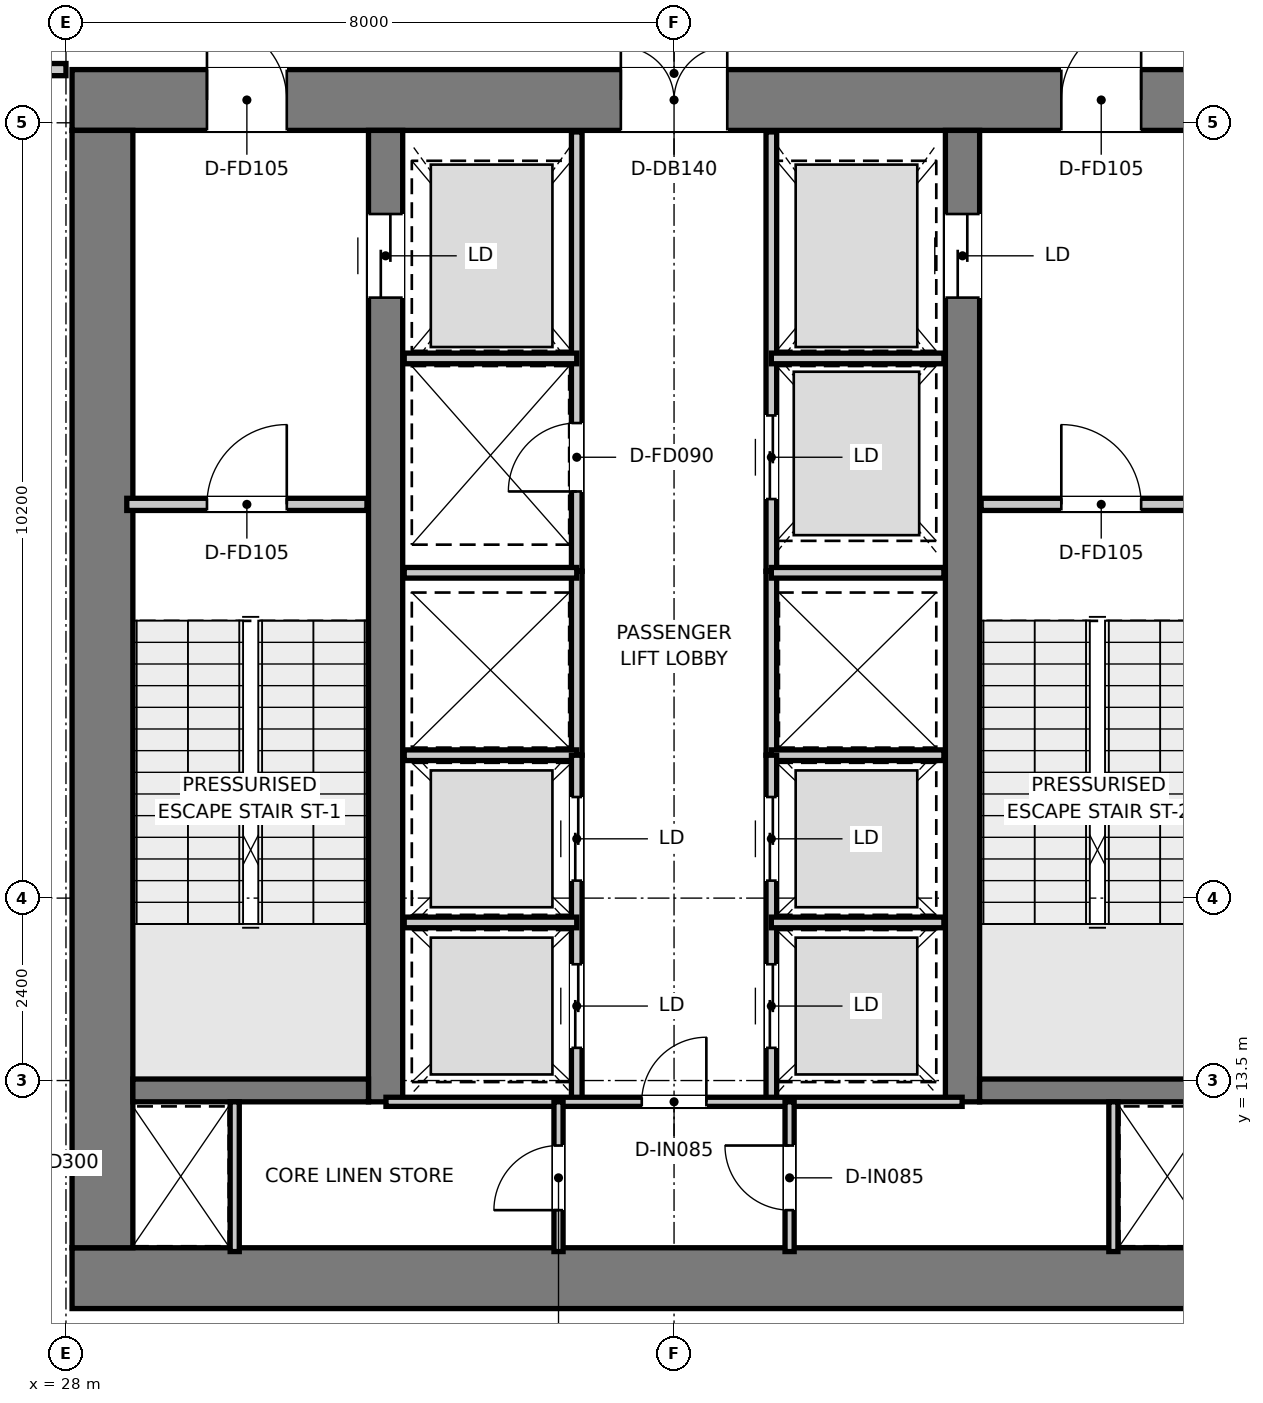
"""IFC4 building model, lengths in metres.
Left out: names, types, materials, properties, quantities, classifications, styles, units other than length and angle.
Written with IfcOpenShell. Run it as: python <this file> out.ifc"""

import sys

from ifc_helpers import new_model, si_unit, direction, frame, frame_2d, origin, place, context, subcontext, project, spatial, rectangle, extrude, element, fill, save


model = new_model("IFC4")
c1 = context("Model", 3, precision=1e-05, world=origin(), true_north=direction((0.0, 1.0)))
c2 = subcontext(c1, "Body", "Model", "MODEL_VIEW")
j1 = project(units=[si_unit("LENGTHUNIT", "METRE"), si_unit("PLANEANGLEUNIT", "RADIAN")], contexts=[c1])
p1 = place(None, origin())
s1 = spatial("IfcSite", under=j1, at=p1, CompositionType="ELEMENT")
p2 = place(p1, origin())
s2 = spatial("IfcBuilding", under=s1, at=p2, CompositionType="ELEMENT")
p3 = place(p2, frame((0.0, 0.0, 10.4)))
s3 = spatial("IfcBuildingStorey", under=s2, at=p3, CompositionType="ELEMENT", Elevation=10.4)
p4 = place(p3, frame((28.08, 10.9, 0.0), z_axis=(0.0, 0.0, 1.0), x_axis=(1.0, 0.0, 0.0)))
e1 = element("IfcWall", 1, at=p4, inside=s3, PredefinedType="SHEAR", context=c2, shape_type="SweptSolid", body=[
    extrude(rectangle(XDim=15.84, YDim=0.8, at=frame_2d((7.92, 0.0))), origin(), (0.0, 0.0, 1.0), 5.0),
])
p5 = place(p3, frame((28.08, 26.4, 0.0), z_axis=(0.0, 0.0, 1.0), x_axis=(1.0, 0.0, 0.0)))
e2 = element("IfcWall", 2, at=p5, inside=s3, PredefinedType="SHEAR", context=c2, shape_type="SweptSolid", body=[
    extrude(rectangle(XDim=15.84, YDim=0.8, at=frame_2d((7.92, 0.0))), origin(), (0.0, 0.0, 1.0), 5.0),
])
p6 = place(p5, frame((7.22, 0.0, 0.0)))
e3 = element("IfcOpeningElement", 3, at=p6, cuts=e2, PredefinedType="OPENING", context=c2, shape_type="SweptSolid", body=[
    extrude(rectangle(XDim=1.4, YDim=2.2, at=frame_2d((0.7, 1.1))), frame((0.0, 0.41, 0.0), z_axis=(0.0, -1.0, 0.0), x_axis=(1.0, 0.0, 0.0)), (0.0, 0.0, 1.0), 0.82),
])
p7 = place(p5, frame((1.775, 0.0, 0.0)))
e4 = element("IfcOpeningElement", 4, at=p7, cuts=e2, PredefinedType="OPENING", context=c2, shape_type="SweptSolid", body=[
    extrude(rectangle(XDim=1.05, YDim=2.1, at=frame_2d((0.525, 1.05))), frame((0.0, 0.41, 0.0), z_axis=(0.0, -1.0, 0.0), x_axis=(1.0, 0.0, 0.0)), (0.0, 0.0, 1.0), 0.82),
])
p8 = place(p5, frame((13.015, 0.0, 0.0)))
e5 = element("IfcOpeningElement", 5, at=p8, cuts=e2, PredefinedType="OPENING", context=c2, shape_type="SweptSolid", body=[
    extrude(rectangle(XDim=1.05, YDim=2.1, at=frame_2d((0.525, 1.05))), frame((0.0, 0.41, 0.0), z_axis=(0.0, -1.0, 0.0), x_axis=(1.0, 0.0, 0.0)), (0.0, 0.0, 1.0), 0.82),
])
p9 = place(p3, frame((28.48, 11.3, 0.0), z_axis=(0.0, 0.0, 1.0), x_axis=(0.0, 1.0, 0.0)))
e6 = element("IfcWall", 6, at=p9, inside=s3, PredefinedType="SHEAR", context=c2, shape_type="SweptSolid", body=[
    extrude(rectangle(XDim=14.7, YDim=0.8, at=frame_2d((7.35, 0.0))), origin(), (0.0, 0.0, 1.0), 5.0),
])
p10 = place(p3, frame((32.205, 13.22, 0.0), z_axis=(0.0, 0.0, 1.0), x_axis=(0.0, 1.0, 0.0)))
e7 = element("IfcWall", 7, at=p10, inside=s3, PredefinedType="SHEAR", context=c2, shape_type="SweptSolid", body=[
    extrude(rectangle(XDim=12.78, YDim=0.45, at=frame_2d((6.39, 0.0))), origin(), (0.0, 0.0, 1.0), 5.0),
])
p11 = place(p10, frame((10.58, 0.0, 0.0)))
e8 = element("IfcOpeningElement", 8, at=p11, cuts=e7, PredefinedType="OPENING", context=c2, shape_type="SweptSolid", body=[
    extrude(rectangle(XDim=1.1, YDim=2.15, at=frame_2d((0.55, 1.075))), frame((0.0, 0.235, 0.0), z_axis=(0.0, -1.0, 0.0), x_axis=(1.0, 0.0, 0.0)), (0.0, 0.0, 1.0), 0.47),
])
p12 = place(p3, frame((39.795, 13.22, 0.0), z_axis=(0.0, 0.0, 1.0), x_axis=(0.0, 1.0, 0.0)))
e9 = element("IfcWall", 9, at=p12, inside=s3, PredefinedType="SHEAR", context=c2, shape_type="SweptSolid", body=[
    extrude(rectangle(XDim=12.78, YDim=0.45, at=frame_2d((6.39, 0.0))), origin(), (0.0, 0.0, 1.0), 5.0),
])
p13 = place(p12, frame((10.58, 0.0, 0.0)))
e10 = element("IfcOpeningElement", 10, at=p13, cuts=e9, PredefinedType="OPENING", context=c2, shape_type="SweptSolid", body=[
    extrude(rectangle(XDim=1.1, YDim=2.15, at=frame_2d((0.55, 1.075))), frame((0.0, 0.235, 0.0), z_axis=(0.0, -1.0, 0.0), x_axis=(1.0, 0.0, 0.0)), (0.0, 0.0, 1.0), 0.47),
])
for number, where, z_axis, x_axis in (
    (11, (28.88, 13.37, 0.0), (0.0, 0.0, 1.0), (1.0, 0.0, 0.0)),
    (12, (40.02, 13.37, 0.0), (0.0, 0.0, 1.0), (1.0, 0.0, 0.0)),
):
    element("IfcWall", number, at=place(p3, frame(where, z_axis=z_axis, x_axis=x_axis)), inside=s3, PredefinedType="SHEAR", context=c2, shape_type="SweptSolid", body=[
        extrude(rectangle(XDim=3.1, YDim=0.3, at=frame_2d((1.55, 0.0))), origin(), (0.0, 0.0, 1.0), 5.0),
    ])
p14 = place(p3, frame((28.8, 21.08, 0.0), z_axis=(0.0, 0.0, 1.0), x_axis=(1.0, 0.0, 0.0)))
e13 = element("IfcWall", 13, at=p14, inside=s3, PredefinedType="PARTITIONING", context=c2, shape_type="SweptSolid", body=[
    extrude(rectangle(XDim=3.16, YDim=0.16, at=frame_2d((1.58, 0.0))), origin(), (0.0, 0.0, 1.0), 4.7),
])
p15 = place(p14, frame((1.055, 0.0, 0.0)))
e14 = element("IfcOpeningElement", 14, at=p15, cuts=e13, PredefinedType="OPENING", context=c2, shape_type="SweptSolid", body=[
    extrude(rectangle(XDim=1.05, YDim=2.1, at=frame_2d((0.525, 1.05))), frame((0.0, 0.09, 0.0), z_axis=(0.0, -1.0, 0.0), x_axis=(1.0, 0.0, 0.0)), (0.0, 0.0, 1.0), 0.18),
])
p16 = place(p3, frame((40.04, 21.08, 0.0), z_axis=(0.0, 0.0, 1.0), x_axis=(1.0, 0.0, 0.0)))
e15 = element("IfcWall", 15, at=p16, inside=s3, PredefinedType="PARTITIONING", context=c2, shape_type="SweptSolid", body=[
    extrude(rectangle(XDim=3.16, YDim=0.16, at=frame_2d((1.58, 0.0))), origin(), (0.0, 0.0, 1.0), 4.7),
])
p17 = place(p16, frame((1.055, 0.0, 0.0)))
e16 = element("IfcOpeningElement", 16, at=p17, cuts=e15, PredefinedType="OPENING", context=c2, shape_type="SweptSolid", body=[
    extrude(rectangle(XDim=1.05, YDim=2.1, at=frame_2d((0.525, 1.05))), frame((0.0, 0.09, 0.0), z_axis=(0.0, -1.0, 0.0), x_axis=(1.0, 0.0, 0.0)), (0.0, 0.0, 1.0), 0.18),
])
p18 = place(p3, frame((34.72, 20.2, 0.0), z_axis=(0.0, 0.0, 1.0), x_axis=(0.0, 1.0, 0.0)))
e17 = element("IfcWall", 17, at=p18, inside=s3, PredefinedType="PARTITIONING", context=c2, shape_type="SweptSolid", body=[
    extrude(rectangle(XDim=5.78, YDim=0.14, at=frame_2d((2.89, 0.0))), origin(), (0.0, 0.0, 1.0), 3.5),
])
p19 = place(p18, frame((1.05, 0.0, 0.0)))
e18 = element("IfcOpeningElement", 18, at=p19, cuts=e17, PredefinedType="OPENING", context=c2, shape_type="SweptSolid", body=[
    extrude(rectangle(XDim=0.9, YDim=2.1, at=frame_2d((0.45, 1.05))), frame((0.0, 0.08, 0.0), z_axis=(0.0, -1.0, 0.0), x_axis=(1.0, 0.0, 0.0)), (0.0, 0.0, 1.0), 0.16),
])
p20 = place(p3, frame((37.28, 20.2, 0.0), z_axis=(0.0, 0.0, 1.0), x_axis=(0.0, 1.0, 0.0)))
e19 = element("IfcWall", 19, at=p20, inside=s3, PredefinedType="PARTITIONING", context=c2, shape_type="SweptSolid", body=[
    extrude(rectangle(XDim=5.78, YDim=0.14, at=frame_2d((2.89, 0.0))), origin(), (0.0, 0.0, 1.0), 3.5),
])
p21 = place(p20, frame((0.95, 0.0, 0.0)))
e20 = element("IfcOpeningElement", 20, at=p21, cuts=e19, PredefinedType="OPENING", context=c2, shape_type="SweptSolid", body=[
    extrude(rectangle(XDim=1.1, YDim=2.15, at=frame_2d((0.55, 1.075))), frame((0.0, 0.08, 0.0), z_axis=(0.0, -1.0, 0.0), x_axis=(1.0, 0.0, 0.0)), (0.0, 0.0, 1.0), 0.16),
])
for number, where, z_axis, x_axis in (
    (21, (32.45, 23.0, 0.0), (0.0, 0.0, 1.0), (1.0, 0.0, 0.0)),
    (22, (37.28, 23.0, 0.0), (0.0, 0.0, 1.0), (1.0, 0.0, 0.0)),
):
    element("IfcWall", number, at=place(p3, frame(where, z_axis=z_axis, x_axis=x_axis)), inside=s3, PredefinedType="PARTITIONING", context=c2, shape_type="SweptSolid", body=[
        extrude(rectangle(XDim=2.27, YDim=0.14, at=frame_2d((1.135, 0.0))), origin(), (0.0, 0.0, 1.0), 3.5),
    ])
for number, where, z_axis, x_axis in (
    (23, (34.72, 17.78, 0.0), (0.0, 0.0, 1.0), (0.0, 1.0, 0.0)),
    (24, (37.28, 17.78, 0.0), (0.0, 0.0, 1.0), (0.0, 1.0, 0.0)),
):
    element("IfcWall", number, at=place(p3, frame(where, z_axis=z_axis, x_axis=x_axis)), inside=s3, PredefinedType="PARTITIONING", context=c2, shape_type="SweptSolid", body=[
        extrude(rectangle(XDim=2.42, YDim=0.14, at=frame_2d((1.21, 0.0))), origin(), (0.0, 0.0, 1.0), 4.7),
    ])
for number, where, z_axis, x_axis in (
    (25, (32.45, 17.78, 0.0), (0.0, 0.0, 1.0), (1.0, 0.0, 0.0)),
    (26, (32.45, 20.18, 0.0), (0.0, 0.0, 1.0), (1.0, 0.0, 0.0)),
    (27, (37.28, 17.78, 0.0), (0.0, 0.0, 1.0), (1.0, 0.0, 0.0)),
    (28, (37.28, 20.18, 0.0), (0.0, 0.0, 1.0), (1.0, 0.0, 0.0)),
):
    element("IfcWall", number, at=place(p3, frame(where, z_axis=z_axis, x_axis=x_axis)), inside=s3, PredefinedType="PARTITIONING", context=c2, shape_type="SweptSolid", body=[
        extrude(rectangle(XDim=2.27, YDim=0.14, at=frame_2d((1.135, 0.0))), origin(), (0.0, 0.0, 1.0), 4.7),
    ])
p22 = place(p3, frame((34.72, 13.22, 0.0), z_axis=(0.0, 0.0, 1.0), x_axis=(0.0, 1.0, 0.0)))
e29 = element("IfcWall", 29, at=p22, inside=s3, PredefinedType="PARTITIONING", context=c2, shape_type="SweptSolid", body=[
    extrude(rectangle(XDim=4.56, YDim=0.14, at=frame_2d((2.28, 0.0))), origin(), (0.0, 0.0, 1.0), 4.7),
])
p23 = place(p22, frame((0.71, 0.0, 0.0)))
e30 = element("IfcOpeningElement", 30, at=p23, cuts=e29, PredefinedType="OPENING", context=c2, shape_type="SweptSolid", body=[
    extrude(rectangle(XDim=1.1, YDim=2.15, at=frame_2d((0.55, 1.075))), frame((0.0, 0.08, 0.0), z_axis=(0.0, -1.0, 0.0), x_axis=(1.0, 0.0, 0.0)), (0.0, 0.0, 1.0), 0.16),
])
p24 = place(p22, frame((2.91, 0.0, 0.0)))
e31 = element("IfcOpeningElement", 31, at=p24, cuts=e29, PredefinedType="OPENING", context=c2, shape_type="SweptSolid", body=[
    extrude(rectangle(XDim=1.1, YDim=2.15, at=frame_2d((0.55, 1.075))), frame((0.0, 0.08, 0.0), z_axis=(0.0, -1.0, 0.0), x_axis=(1.0, 0.0, 0.0)), (0.0, 0.0, 1.0), 0.16),
])
p25 = place(p3, frame((32.45, 15.58, 0.0), z_axis=(0.0, 0.0, 1.0), x_axis=(1.0, 0.0, 0.0)))
e32 = element("IfcWall", 32, at=p25, inside=s3, PredefinedType="PARTITIONING", context=c2, shape_type="SweptSolid", body=[
    extrude(rectangle(XDim=2.27, YDim=0.14, at=frame_2d((1.135, 0.0))), origin(), (0.0, 0.0, 1.0), 4.7),
])
p26 = place(p3, frame((37.28, 13.22, 0.0), z_axis=(0.0, 0.0, 1.0), x_axis=(0.0, 1.0, 0.0)))
e33 = element("IfcWall", 33, at=p26, inside=s3, PredefinedType="PARTITIONING", context=c2, shape_type="SweptSolid", body=[
    extrude(rectangle(XDim=4.56, YDim=0.14, at=frame_2d((2.28, 0.0))), origin(), (0.0, 0.0, 1.0), 4.7),
])
p27 = place(p26, frame((0.71, 0.0, 0.0)))
e34 = element("IfcOpeningElement", 34, at=p27, cuts=e33, PredefinedType="OPENING", context=c2, shape_type="SweptSolid", body=[
    extrude(rectangle(XDim=1.1, YDim=2.15, at=frame_2d((0.55, 1.075))), frame((0.0, 0.08, 0.0), z_axis=(0.0, -1.0, 0.0), x_axis=(1.0, 0.0, 0.0)), (0.0, 0.0, 1.0), 0.16),
])
p28 = place(p26, frame((2.91, 0.0, 0.0)))
e35 = element("IfcOpeningElement", 35, at=p28, cuts=e33, PredefinedType="OPENING", context=c2, shape_type="SweptSolid", body=[
    extrude(rectangle(XDim=1.1, YDim=2.15, at=frame_2d((0.55, 1.075))), frame((0.0, 0.08, 0.0), z_axis=(0.0, -1.0, 0.0), x_axis=(1.0, 0.0, 0.0)), (0.0, 0.0, 1.0), 0.16),
])
p29 = place(p3, frame((37.28, 15.58, 0.0), z_axis=(0.0, 0.0, 1.0), x_axis=(1.0, 0.0, 0.0)))
e36 = element("IfcWall", 36, at=p29, inside=s3, PredefinedType="PARTITIONING", context=c2, shape_type="SweptSolid", body=[
    extrude(rectangle(XDim=2.27, YDim=0.14, at=frame_2d((1.135, 0.0))), origin(), (0.0, 0.0, 1.0), 4.7),
])
for number, where, z_axis, x_axis in (
    (37, (30.22, 11.25, 0.0), (0.0, 0.0, 1.0), (0.0, 1.0, 0.0)),
    (38, (41.78, 11.25, 0.0), (0.0, 0.0, 1.0), (0.0, 1.0, 0.0)),
):
    element("IfcWall", number, at=place(p3, frame(where, z_axis=z_axis, x_axis=x_axis)), inside=s3, PredefinedType="PARTITIONING", context=c2, shape_type="SweptSolid", body=[
        extrude(rectangle(XDim=1.97, YDim=0.12, at=frame_2d((0.985, 0.0))), origin(), (0.0, 0.0, 1.0), 4.7),
    ])
p30 = place(p3, frame((32.21, 13.22, 0.0), z_axis=(0.0, 0.0, 1.0), x_axis=(1.0, 0.0, 0.0)))
e39 = element("IfcWall", 39, at=p30, inside=s3, PredefinedType="PARTITIONING", context=c2, shape_type="SweptSolid", body=[
    extrude(rectangle(XDim=7.58, YDim=0.12, at=frame_2d((3.79, 0.0))), origin(), (0.0, 0.0, 1.0), 4.7),
])
p31 = place(p30, frame((3.365, 0.0, 0.0)))
e40 = element("IfcOpeningElement", 40, at=p31, cuts=e39, PredefinedType="OPENING", context=c2, shape_type="SweptSolid", body=[
    extrude(rectangle(XDim=0.85, YDim=2.1, at=frame_2d((0.425, 1.05))), frame((0.0, 0.07, 0.0), z_axis=(0.0, -1.0, 0.0), x_axis=(1.0, 0.0, 0.0)), (0.0, 0.0, 1.0), 0.14),
])
p32 = place(p3, frame((34.48, 11.25, 0.0), z_axis=(0.0, 0.0, 1.0), x_axis=(0.0, 1.0, 0.0)))
e41 = element("IfcWall", 41, at=p32, inside=s3, PredefinedType="PARTITIONING", context=c2, shape_type="SweptSolid", body=[
    extrude(rectangle(XDim=1.97, YDim=0.12, at=frame_2d((0.985, 0.0))), origin(), (0.0, 0.0, 1.0), 4.7),
])
p33 = place(p32, frame((0.545, 0.0, 0.0)))
e42 = element("IfcOpeningElement", 42, at=p33, cuts=e41, PredefinedType="OPENING", context=c2, shape_type="SweptSolid", body=[
    extrude(rectangle(XDim=0.85, YDim=2.1, at=frame_2d((0.425, 1.05))), frame((0.0, 0.07, 0.0), z_axis=(0.0, -1.0, 0.0), x_axis=(1.0, 0.0, 0.0)), (0.0, 0.0, 1.0), 0.14),
])
p34 = place(p3, frame((37.52, 11.25, 0.0), z_axis=(0.0, 0.0, 1.0), x_axis=(0.0, 1.0, 0.0)))
e43 = element("IfcWall", 43, at=p34, inside=s3, PredefinedType="PARTITIONING", context=c2, shape_type="SweptSolid", body=[
    extrude(rectangle(XDim=1.97, YDim=0.12, at=frame_2d((0.985, 0.0))), origin(), (0.0, 0.0, 1.0), 4.7),
])
p35 = place(p34, frame((0.545, 0.0, 0.0)))
e44 = element("IfcOpeningElement", 44, at=p35, cuts=e43, PredefinedType="OPENING", context=c2, shape_type="SweptSolid", body=[
    extrude(rectangle(XDim=0.85, YDim=2.1, at=frame_2d((0.425, 1.05))), frame((0.0, 0.07, 0.0), z_axis=(0.0, -1.0, 0.0), x_axis=(1.0, 0.0, 0.0)), (0.0, 0.0, 1.0), 0.14),
])
p36 = place(p3, frame((24.08, 26.8, 0.0), z_axis=(0.0, 0.0, 1.0), x_axis=(1.0, 0.0, 0.0)))
e45 = element("IfcWall", 45, at=p36, inside=s3, PredefinedType="PARTITIONING", context=c2, shape_type="SweptSolid", body=[
    extrude(rectangle(XDim=3.92, YDim=0.16, at=frame_2d((1.96, 0.0))), origin(), (0.0, 0.0, 1.0), 3.9),
])
p37 = place(p15, origin())
e46 = element("IfcDoor", 46, at=p37, inside=s3, OperationType="SINGLE_SWING_RIGHT", PredefinedType="DOOR", context=c2, shape_type="SweptSolid", body=[
    extrude(rectangle(XDim=1.05, YDim=2.1, at=frame_2d((0.525, 1.05))), frame((0.0, 0.025, 0.0), z_axis=(0.0, -1.0, 0.0), x_axis=(1.0, 0.0, 0.0)), (0.0, 0.0, 1.0), 0.05),
])
fill(e14, e46)
p38 = place(p17, origin())
e47 = element("IfcDoor", 47, at=p38, inside=s3, OperationType="SINGLE_SWING_LEFT", PredefinedType="DOOR", context=c2, shape_type="SweptSolid", body=[
    extrude(rectangle(XDim=1.05, YDim=2.1, at=frame_2d((0.525, 1.05))), frame((0.0, 0.025, 0.0), z_axis=(0.0, -1.0, 0.0), x_axis=(1.0, 0.0, 0.0)), (0.0, 0.0, 1.0), 0.05),
])
fill(e16, e47)
p39 = place(p6, origin())
e48 = element("IfcDoor", 48, at=p39, inside=s3, OperationType="DOUBLE_DOOR_SINGLE_SWING", PredefinedType="DOOR", context=c2, shape_type="SweptSolid", body=[
    extrude(rectangle(XDim=1.4, YDim=2.2, at=frame_2d((0.7, 1.1))), frame((0.0, 0.025, 0.0), z_axis=(0.0, -1.0, 0.0), x_axis=(1.0, 0.0, 0.0)), (0.0, 0.0, 1.0), 0.05),
])
fill(e3, e48)
p40 = place(p7, origin())
e49 = element("IfcDoor", 49, at=p40, inside=s3, OperationType="SINGLE_SWING_LEFT", PredefinedType="DOOR", context=c2, shape_type="SweptSolid", body=[
    extrude(rectangle(XDim=1.05, YDim=2.1, at=frame_2d((0.525, 1.05))), frame((0.0, 0.025, 0.0), z_axis=(0.0, -1.0, 0.0), x_axis=(1.0, 0.0, 0.0)), (0.0, 0.0, 1.0), 0.05),
])
fill(e4, e49)
p41 = place(p8, origin())
e50 = element("IfcDoor", 50, at=p41, inside=s3, OperationType="SINGLE_SWING_RIGHT", PredefinedType="DOOR", context=c2, shape_type="SweptSolid", body=[
    extrude(rectangle(XDim=1.05, YDim=2.1, at=frame_2d((0.525, 1.05))), frame((0.0, 0.025, 0.0), z_axis=(0.0, -1.0, 0.0), x_axis=(1.0, 0.0, 0.0)), (0.0, 0.0, 1.0), 0.05),
])
fill(e5, e50)
p42 = place(p11, origin())
e51 = element("IfcDoor", 51, at=p42, inside=s3, OperationType="DOUBLE_DOOR_SLIDING", PredefinedType="DOOR", context=c2, shape_type="SweptSolid", body=[
    extrude(rectangle(XDim=1.1, YDim=2.15, at=frame_2d((0.55, 1.075))), frame((0.0, 0.025, 0.0), z_axis=(0.0, -1.0, 0.0), x_axis=(1.0, 0.0, 0.0)), (0.0, 0.0, 1.0), 0.05),
])
fill(e8, e51)
p43 = place(p13, origin())
e52 = element("IfcDoor", 52, at=p43, inside=s3, OperationType="DOUBLE_DOOR_SLIDING", PredefinedType="DOOR", context=c2, shape_type="SweptSolid", body=[
    extrude(rectangle(XDim=1.1, YDim=2.15, at=frame_2d((0.55, 1.075))), frame((0.0, 0.025, 0.0), z_axis=(0.0, -1.0, 0.0), x_axis=(1.0, 0.0, 0.0)), (0.0, 0.0, 1.0), 0.05),
])
fill(e10, e52)
p44 = place(p19, origin())
e53 = element("IfcDoor", 53, at=p44, inside=s3, OperationType="SINGLE_SWING_LEFT", PredefinedType="DOOR", context=c2, shape_type="SweptSolid", body=[
    extrude(rectangle(XDim=0.9, YDim=2.1, at=frame_2d((0.45, 1.05))), frame((0.0, 0.025, 0.0), z_axis=(0.0, -1.0, 0.0), x_axis=(1.0, 0.0, 0.0)), (0.0, 0.0, 1.0), 0.05),
])
fill(e18, e53)
p45 = place(p21, origin())
e54 = element("IfcDoor", 54, at=p45, inside=s3, OperationType="DOUBLE_DOOR_SLIDING", PredefinedType="DOOR", context=c2, shape_type="SweptSolid", body=[
    extrude(rectangle(XDim=1.1, YDim=2.15, at=frame_2d((0.55, 1.075))), frame((0.0, 0.025, 0.0), z_axis=(0.0, -1.0, 0.0), x_axis=(1.0, 0.0, 0.0)), (0.0, 0.0, 1.0), 0.05),
])
fill(e20, e54)
p46 = place(p23, origin())
e55 = element("IfcDoor", 55, at=p46, inside=s3, OperationType="DOUBLE_DOOR_SLIDING", PredefinedType="DOOR", context=c2, shape_type="SweptSolid", body=[
    extrude(rectangle(XDim=1.1, YDim=2.15, at=frame_2d((0.55, 1.075))), frame((0.0, 0.025, 0.0), z_axis=(0.0, -1.0, 0.0), x_axis=(1.0, 0.0, 0.0)), (0.0, 0.0, 1.0), 0.05),
])
fill(e30, e55)
p47 = place(p24, origin())
e56 = element("IfcDoor", 56, at=p47, inside=s3, OperationType="DOUBLE_DOOR_SLIDING", PredefinedType="DOOR", context=c2, shape_type="SweptSolid", body=[
    extrude(rectangle(XDim=1.1, YDim=2.15, at=frame_2d((0.55, 1.075))), frame((0.0, 0.025, 0.0), z_axis=(0.0, -1.0, 0.0), x_axis=(1.0, 0.0, 0.0)), (0.0, 0.0, 1.0), 0.05),
])
fill(e31, e56)
p48 = place(p27, origin())
e57 = element("IfcDoor", 57, at=p48, inside=s3, OperationType="DOUBLE_DOOR_SLIDING", PredefinedType="DOOR", context=c2, shape_type="SweptSolid", body=[
    extrude(rectangle(XDim=1.1, YDim=2.15, at=frame_2d((0.55, 1.075))), frame((0.0, 0.025, 0.0), z_axis=(0.0, -1.0, 0.0), x_axis=(1.0, 0.0, 0.0)), (0.0, 0.0, 1.0), 0.05),
])
fill(e34, e57)
p49 = place(p28, origin())
e58 = element("IfcDoor", 58, at=p49, inside=s3, OperationType="DOUBLE_DOOR_SLIDING", PredefinedType="DOOR", context=c2, shape_type="SweptSolid", body=[
    extrude(rectangle(XDim=1.1, YDim=2.15, at=frame_2d((0.55, 1.075))), frame((0.0, 0.025, 0.0), z_axis=(0.0, -1.0, 0.0), x_axis=(1.0, 0.0, 0.0)), (0.0, 0.0, 1.0), 0.05),
])
fill(e35, e58)
p50 = place(p31, origin())
e59 = element("IfcDoor", 59, at=p50, inside=s3, OperationType="SINGLE_SWING_RIGHT", PredefinedType="DOOR", context=c2, shape_type="SweptSolid", body=[
    extrude(rectangle(XDim=0.85, YDim=2.1, at=frame_2d((0.425, 1.05))), frame((0.0, 0.025, 0.0), z_axis=(0.0, -1.0, 0.0), x_axis=(1.0, 0.0, 0.0)), (0.0, 0.0, 1.0), 0.05),
])
fill(e40, e59)
p51 = place(p33, origin())
e60 = element("IfcDoor", 60, at=p51, inside=s3, OperationType="SINGLE_SWING_LEFT", PredefinedType="DOOR", context=c2, shape_type="SweptSolid", body=[
    extrude(rectangle(XDim=0.85, YDim=2.1, at=frame_2d((0.425, 1.05))), frame((0.0, 0.025, 0.0), z_axis=(0.0, -1.0, 0.0), x_axis=(1.0, 0.0, 0.0)), (0.0, 0.0, 1.0), 0.05),
])
fill(e42, e60)
p52 = place(p35, origin())
e61 = element("IfcDoor", 61, at=p52, inside=s3, OperationType="SINGLE_SWING_RIGHT", PredefinedType="DOOR", context=c2, shape_type="SweptSolid", body=[
    extrude(rectangle(XDim=0.85, YDim=2.1, at=frame_2d((0.425, 1.05))), frame((0.0, 0.025, 0.0), z_axis=(0.0, -1.0, 0.0), x_axis=(1.0, 0.0, 0.0)), (0.0, 0.0, 1.0), 0.05),
])
fill(e44, e61)
save(model, sys.argv[1])
